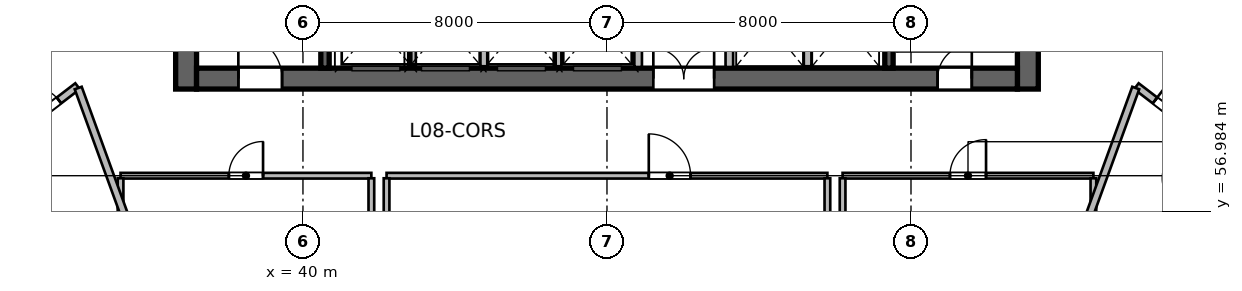
"""IFC4 building model, lengths in metres.
Left out: names, types, materials, properties, quantities, classifications, styles, units other than length and angle.
Written with IfcOpenShell. Run it as: python <this file> out.ifc"""

import sys

from ifc_helpers import new_model, si_unit, direction, frame, frame_2d, origin, place, context, subcontext, project, spatial, rectangle, extrude, source, transform, mapped, element, fill, save


model = new_model("IFC4")
c1 = context("Model", 3, precision=1e-05, world=origin(), true_north=direction((0.0, 1.0)))
c2 = subcontext(c1, "Body", "Model", "MODEL_VIEW")
j1 = project(units=[si_unit("LENGTHUNIT", "METRE"), si_unit("PLANEANGLEUNIT", "RADIAN")], contexts=[c1])
p1 = place(None, origin())
s1 = spatial("IfcSite", under=j1, at=p1, CompositionType="ELEMENT")
p2 = place(p1, origin())
s2 = spatial("IfcBuilding", under=s1, at=p2, CompositionType="ELEMENT")
p3 = place(p2, frame((0.0, 0.0, 42.6)))
s3 = spatial("IfcBuildingStorey", under=s2, at=p3, CompositionType="ELEMENT", Elevation=42.6)
m1 = source(origin(), c2, "Body", "SweptSolid", [
    extrude(rectangle(XDim=12.0, YDim=0.55, at=frame_2d((6.0, 0.0))), origin(), (0.0, 0.0, 1.0), 3.6),
])
for number, where, z_axis, x_axis in (
    (1, (36.925, 60.2, 0.0), (0.0, 0.0, 1.0), (0.0, 1.0, 0.0)),
    (2, (59.075, 60.2, 0.0), (0.0, 0.0, 1.0), (0.0, 1.0, 0.0)),
):
    element("IfcWall", number, at=place(p3, frame(where, z_axis=z_axis, x_axis=x_axis)), inside=s3, PredefinedType="SHEAR", context=c2, shape_type="MappedRepresentation", body=[
        mapped(m1, transform((0.0, 0.0, 0.0), scale=1.0)),
    ])
m2 = source(origin(), c2, "Body", "SweptSolid", [
    extrude(rectangle(XDim=21.6, YDim=0.55, at=frame_2d((10.8, 0.0))), origin(), (0.0, 0.0, 1.0), 3.6),
])
p4 = place(p3, frame((37.2, 60.475, 0.0), z_axis=(0.0, 0.0, 1.0), x_axis=(1.0, 0.0, 0.0)))
e3 = element("IfcWall", 3, at=p4, inside=s3, PredefinedType="SHEAR", context=c2, shape_type="MappedRepresentation", body=[
    mapped(m2, transform((0.0, 0.0, 0.0), scale=1.0)),
])
p5 = place(p4, frame((1.1, 0.0, 0.0)))
e4 = element("IfcOpeningElement", 4, at=p5, cuts=e3, PredefinedType="OPENING", context=c2, shape_type="SweptSolid", body=[
    extrude(rectangle(XDim=1.15, YDim=2.15, at=frame_2d((0.575, 1.075))), frame((0.0, 0.285, 0.0), z_axis=(0.0, -1.0, 0.0), x_axis=(1.0, 0.0, 0.0)), (0.0, 0.0, 1.0), 0.57),
])
p6 = place(p4, frame((19.5, 0.0, 0.0)))
e5 = element("IfcOpeningElement", 5, at=p6, cuts=e3, PredefinedType="OPENING", context=c2, shape_type="SweptSolid", body=[
    extrude(rectangle(XDim=0.9, YDim=2.1, at=frame_2d((0.45, 1.05))), frame((0.0, 0.285, 0.0), z_axis=(0.0, -1.0, 0.0), x_axis=(1.0, 0.0, 0.0)), (0.0, 0.0, 1.0), 0.57),
])
p7 = place(p4, frame((12.02, 0.0, 0.0)))
e6 = element("IfcOpeningElement", 6, at=p7, cuts=e3, PredefinedType="OPENING", context=c2, shape_type="SweptSolid", body=[
    extrude(rectangle(XDim=1.6, YDim=2.15, at=frame_2d((0.8, 1.075))), frame((0.0, 0.285, 0.0), z_axis=(0.0, -1.0, 0.0), x_axis=(1.0, 0.0, 0.0)), (0.0, 0.0, 1.0), 0.57),
])
m3 = source(origin(), c2, "Body", "SweptSolid", [
    extrude(rectangle(XDim=10.9, YDim=0.22, at=frame_2d((5.45, 0.0))), origin(), (0.0, 0.0, 1.0), 3.6),
])
p8 = place(p3, frame((40.58, 60.75, 0.0), z_axis=(0.0, 0.0, 1.0), x_axis=(0.0, 1.0, 0.0)))
e7 = element("IfcWall", 7, at=p8, inside=s3, PredefinedType="SHEAR", context=c2, shape_type="MappedRepresentation", body=[
    mapped(m3, transform((0.0, 0.0, 0.0), scale=1.0)),
])
p9 = place(p3, frame((55.42, 60.75, 0.0), z_axis=(0.0, 0.0, 1.0), x_axis=(0.0, 1.0, 0.0)))
e8 = element("IfcWall", 8, at=p9, inside=s3, PredefinedType="SHEAR", context=c2, shape_type="MappedRepresentation", body=[
    mapped(m3, transform((0.0, 0.0, 0.0), scale=1.0)),
])
p10 = place(p9, frame((9.495, 0.0, 0.0)))
e9 = element("IfcOpeningElement", 9, at=p10, cuts=e8, PredefinedType="OPENING", context=c2, shape_type="SweptSolid", body=[
    extrude(rectangle(XDim=1.15, YDim=2.15, at=frame_2d((0.575, 1.075))), frame((0.0, 0.12, 0.0), z_axis=(0.0, -1.0, 0.0), x_axis=(1.0, 0.0, 0.0)), (0.0, 0.0, 1.0), 0.24),
])
m4 = source(origin(), c2, "Body", "SweptSolid", [
    extrude(rectangle(XDim=2.24, YDim=0.2, at=frame_2d((1.12, 0.0))), origin(), (0.0, 0.0, 1.0), 3.36),
])
for number, where, z_axis, x_axis in (
    (10, (48.82, 60.78, 0.0), (0.0, 0.0, 1.0), (0.0, 1.0, 0.0)),
    (11, (51.22, 60.78, 0.0), (0.0, 0.0, 1.0), (0.0, 1.0, 0.0)),
):
    element("IfcWall", number, at=place(p3, frame(where, z_axis=z_axis, x_axis=x_axis)), inside=s3, PredefinedType="SOLIDWALL", context=c2, shape_type="MappedRepresentation", body=[
        mapped(m4, transform((0.0, 0.0, 0.0), scale=1.0)),
    ])
m5 = source(origin(), c2, "Body", "SweptSolid", [
    extrude(rectangle(XDim=2.2, YDim=0.2, at=frame_2d((1.1, 0.0))), origin(), (0.0, 0.0, 1.0), 3.36),
])
for number, where, z_axis, x_axis in (
    (12, (42.87, 60.8, 0.0), (0.0, 0.0, 1.0), (0.0, 1.0, 0.0)),
    (13, (44.77, 60.8, 0.0), (0.0, 0.0, 1.0), (0.0, 1.0, 0.0)),
    (14, (46.7, 60.8, 0.0), (0.0, 0.0, 1.0), (0.0, 1.0, 0.0)),
    (15, (53.28, 60.8, 0.0), (0.0, 0.0, 1.0), (0.0, 1.0, 0.0)),
):
    element("IfcWall", number, at=place(p3, frame(where, z_axis=z_axis, x_axis=x_axis)), inside=s3, PredefinedType="SOLIDWALL", context=c2, shape_type="MappedRepresentation", body=[
        mapped(m5, transform((0.0, 0.0, 0.0), scale=1.0)),
    ])
m6 = source(origin(), c2, "Body", "SweptSolid", [
    extrude(rectangle(XDim=6.6, YDim=0.15, at=frame_2d((3.3, 0.0))), origin(), (0.0, 0.0, 1.0), 3.36),
])
p11 = place(p3, frame((35.2, 57.92, 0.0), z_axis=(0.0, 0.0, 1.0), x_axis=(1.0, 0.0, 0.0)))
e16 = element("IfcWall", 16, at=p11, inside=s3, PredefinedType="PARTITIONING", context=c2, shape_type="MappedRepresentation", body=[
    mapped(m6, transform((0.0, 0.0, 0.0), scale=1.0)),
])
p12 = place(p11, frame((2.85, 0.0, 0.0)))
e17 = element("IfcOpeningElement", 17, at=p12, cuts=e16, PredefinedType="OPENING", context=c2, shape_type="SweptSolid", body=[
    extrude(rectangle(XDim=0.9, YDim=2.1, at=frame_2d((0.45, 1.05))), frame((0.0, 0.085, 0.0), z_axis=(0.0, -1.0, 0.0), x_axis=(1.0, 0.0, 0.0)), (0.0, 0.0, 1.0), 0.17),
])
m7 = source(origin(), c2, "Body", "SweptSolid", [
    extrude(rectangle(XDim=3.785, YDim=0.15, at=frame_2d((1.893, 0.0))), origin(), (0.0, 0.0, 1.0), 3.36),
])
for number, where, z_axis, x_axis in (
    (18, (35.2, 54.067, 0.0), (0.0, 0.0, 1.0), (0.0, 1.0, 0.0)),
    (19, (41.8, 54.067, 0.0), (0.0, 0.0, 1.0), (0.0, 1.0, 0.0)),
):
    element("IfcWall", number, at=place(p3, frame(where, z_axis=z_axis, x_axis=x_axis)), inside=s3, PredefinedType="PARTITIONING", context=c2, shape_type="MappedRepresentation", body=[
        mapped(m7, transform((0.0, 0.0, 0.0), scale=1.0)),
    ])
m8 = source(origin(), c2, "Body", "SweptSolid", [
    extrude(rectangle(XDim=11.6, YDim=0.15, at=frame_2d((5.8, 0.0))), origin(), (0.0, 0.0, 1.0), 3.36),
])
p13 = place(p3, frame((42.2, 57.92, 0.0), z_axis=(0.0, 0.0, 1.0), x_axis=(1.0, 0.0, 0.0)))
e20 = element("IfcWall", 20, at=p13, inside=s3, PredefinedType="PARTITIONING", context=c2, shape_type="MappedRepresentation", body=[
    mapped(m8, transform((0.0, 0.0, 0.0), scale=1.0)),
])
p14 = place(p13, frame((6.9, 0.0, 0.0)))
e21 = element("IfcOpeningElement", 21, at=p14, cuts=e20, PredefinedType="OPENING", context=c2, shape_type="SweptSolid", body=[
    extrude(rectangle(XDim=1.1, YDim=2.15, at=frame_2d((0.55, 1.075))), frame((0.0, 0.085, 0.0), z_axis=(0.0, -1.0, 0.0), x_axis=(1.0, 0.0, 0.0)), (0.0, 0.0, 1.0), 0.17),
])
for number, where, z_axis, x_axis in (
    (22, (42.2, 54.067, 0.0), (0.0, 0.0, 1.0), (0.0, 1.0, 0.0)),
    (23, (53.8, 54.067, 0.0), (0.0, 0.0, 1.0), (0.0, 1.0, 0.0)),
):
    element("IfcWall", number, at=place(p3, frame(where, z_axis=z_axis, x_axis=x_axis)), inside=s3, PredefinedType="PARTITIONING", context=c2, shape_type="MappedRepresentation", body=[
        mapped(m7, transform((0.0, 0.0, 0.0), scale=1.0)),
    ])
p15 = place(p3, frame((54.2, 57.92, 0.0), z_axis=(0.0, 0.0, 1.0), x_axis=(1.0, 0.0, 0.0)))
e24 = element("IfcWall", 24, at=p15, inside=s3, PredefinedType="PARTITIONING", context=c2, shape_type="MappedRepresentation", body=[
    mapped(m6, transform((0.0, 0.0, 0.0), scale=1.0)),
])
p16 = place(p15, frame((2.825, 0.0, 0.0)))
e25 = element("IfcOpeningElement", 25, at=p16, cuts=e24, PredefinedType="OPENING", context=c2, shape_type="SweptSolid", body=[
    extrude(rectangle(XDim=0.95, YDim=2.1, at=frame_2d((0.475, 1.05))), frame((0.0, 0.085, 0.0), z_axis=(0.0, -1.0, 0.0), x_axis=(1.0, 0.0, 0.0)), (0.0, 0.0, 1.0), 0.17),
])
for number, where, z_axis, x_axis in (
    (26, (54.2, 54.067, 0.0), (0.0, 0.0, 1.0), (0.0, 1.0, 0.0)),
    (27, (60.8, 54.067, 0.0), (0.0, 0.0, 1.0), (0.0, 1.0, 0.0)),
):
    element("IfcWall", number, at=place(p3, frame(where, z_axis=z_axis, x_axis=x_axis)), inside=s3, PredefinedType="PARTITIONING", context=c2, shape_type="MappedRepresentation", body=[
        mapped(m7, transform((0.0, 0.0, 0.0), scale=1.0)),
    ])
m9 = source(origin(), c2, "Body", "SweptSolid", [
    extrude(rectangle(XDim=11.844, YDim=0.195, at=frame_2d((5.922, 0.0))), origin(), (0.0, 0.0, 1.0), 2.644),
])
p17 = place(p3, frame((35.727, 46.848, 0.0), z_axis=(0.0, 0.0, 1.0), x_axis=(-0.442871152218, 0.896585267854, 0.0)))
e28 = element("IfcWall", 28, at=p17, inside=s3, PredefinedType="PARTITIONING", context=c2, shape_type="MappedRepresentation", body=[
    mapped(m9, transform((0.0, 0.0, 0.0), scale=1.0)),
])
m10 = source(origin(), c2, "Body", "SweptSolid", [
    extrude(rectangle(XDim=4.546, YDim=0.195, at=frame_2d((2.273, 0.0))), origin(), (0.0, 0.0, 1.0), 3.36),
])
p18 = place(p3, frame((30.459, 57.511, 0.0), z_axis=(0.0, 0.0, 1.0), x_axis=(0.793907931297, 0.608037989457, 0.0)))
e29 = element("IfcWall", 29, at=p18, inside=s3, PredefinedType="PARTITIONING", context=c2, shape_type="MappedRepresentation", body=[
    mapped(m10, transform((0.0, 0.0, 0.0), scale=1.0)),
])
p19 = place(p18, frame((2.98, 0.0, 0.0)))
e30 = element("IfcOpeningElement", 30, at=p19, cuts=e29, PredefinedType="OPENING", context=c2, shape_type="SweptSolid", body=[
    extrude(rectangle(XDim=0.95, YDim=2.15, at=frame_2d((0.475, 1.075))), frame((0.0, 0.107, 0.0), z_axis=(0.0, -1.0, 0.0), x_axis=(1.0, 0.0, 0.0)), (0.0, 0.0, 1.0), 0.215),
])
m11 = source(origin(), c2, "Body", "SweptSolid", [
    extrude(rectangle(XDim=12.196, YDim=0.195, at=frame_2d((6.098, 0.0))), origin(), (0.0, 0.0, 1.0), 3.36),
])
p20 = place(p3, frame((38.258, 48.766, 0.0), z_axis=(0.0, 0.0, 1.0), x_axis=(-0.342022711534, 0.939691686031, 0.0)))
e31 = element("IfcWall", 31, at=p20, inside=s3, PredefinedType="PARTITIONING", context=c2, shape_type="MappedRepresentation", body=[
    mapped(m11, transform((0.0, 0.0, 0.0), scale=1.0)),
])
p21 = place(p3, frame((61.931, 60.275, 0.0), z_axis=(0.0, 0.0, 1.0), x_axis=(0.793907931297, -0.608037989457, 0.0)))
e32 = element("IfcWall", 32, at=p21, inside=s3, PredefinedType="PARTITIONING", context=c2, shape_type="MappedRepresentation", body=[
    mapped(m10, transform((0.0, 0.0, 0.0), scale=1.0)),
])
p22 = place(p21, frame((0.616, 0.0, 0.0)))
e33 = element("IfcOpeningElement", 33, at=p22, cuts=e32, PredefinedType="OPENING", context=c2, shape_type="SweptSolid", body=[
    extrude(rectangle(XDim=0.95, YDim=2.15, at=frame_2d((0.475, 1.075))), frame((0.0, 0.107, 0.0), z_axis=(0.0, -1.0, 0.0), x_axis=(1.0, 0.0, 0.0)), (0.0, 0.0, 1.0), 0.215),
])
p23 = place(p3, frame((57.742, 48.766, 0.0), z_axis=(0.0, 0.0, 1.0), x_axis=(0.342022711534, 0.939691686031, 0.0)))
e34 = element("IfcWall", 34, at=p23, inside=s3, PredefinedType="PARTITIONING", context=c2, shape_type="MappedRepresentation", body=[
    mapped(m11, transform((0.0, 0.0, 0.0), scale=1.0)),
])
m12 = source(origin(), c2, "Body", "SweptSolid", [
    extrude(rectangle(XDim=11.844, YDim=0.195, at=frame_2d((5.922, 0.0))), origin(), (0.0, 0.0, 1.0), 3.36),
])
p24 = place(p3, frame((60.273, 46.848, 0.0), z_axis=(0.0, 0.0, 1.0), x_axis=(0.442871152218, 0.896585267854, 0.0)))
e35 = element("IfcWall", 35, at=p24, inside=s3, PredefinedType="PARTITIONING", context=c2, shape_type="MappedRepresentation", body=[
    mapped(m12, transform((0.0, 0.0, 0.0), scale=1.0)),
])
m13 = source(origin(), c2, "Body", "SweptSolid", [
    extrude(rectangle(XDim=1.15, YDim=2.15, at=frame_2d((0.575, 1.075))), frame((0.0, 0.025, 0.0), z_axis=(0.0, -1.0, 0.0), x_axis=(1.0, 0.0, 0.0)), (0.0, 0.0, 1.0), 0.05),
])
p25 = place(p5, origin())
e36 = element("IfcDoor", 36, at=p25, inside=s3, OperationType="SINGLE_SWING_LEFT", PredefinedType="DOOR", context=c2, shape_type="MappedRepresentation", body=[
    mapped(m13, transform((0.0, 0.0, 0.0), scale=1.0)),
])
fill(e4, e36)
m14 = source(origin(), c2, "Body", "SweptSolid", [
    extrude(rectangle(XDim=0.9, YDim=2.1, at=frame_2d((0.45, 1.05))), frame((0.0, 0.025, 0.0), z_axis=(0.0, -1.0, 0.0), x_axis=(1.0, 0.0, 0.0)), (0.0, 0.0, 1.0), 0.05),
])
p26 = place(p6, origin())
e37 = element("IfcDoor", 37, at=p26, inside=s3, OperationType="SINGLE_SWING_RIGHT", PredefinedType="DOOR", context=c2, shape_type="MappedRepresentation", body=[
    mapped(m14, transform((0.0, 0.0, 0.0), scale=1.0)),
])
fill(e5, e37)
m15 = source(origin(), c2, "Body", "SweptSolid", [
    extrude(rectangle(XDim=1.6, YDim=2.15, at=frame_2d((0.8, 1.075))), frame((0.0, 0.025, 0.0), z_axis=(0.0, -1.0, 0.0), x_axis=(1.0, 0.0, 0.0)), (0.0, 0.0, 1.0), 0.05),
])
p27 = place(p7, origin())
e38 = element("IfcDoor", 38, at=p27, inside=s3, OperationType="DOUBLE_DOOR_SINGLE_SWING", PredefinedType="DOOR", context=c2, shape_type="MappedRepresentation", body=[
    mapped(m15, transform((0.0, 0.0, 0.0), scale=1.0)),
])
fill(e6, e38)
p28 = place(p12, origin())
e39 = element("IfcDoor", 39, at=p28, inside=s3, OperationType="SINGLE_SWING_RIGHT", PredefinedType="DOOR", context=c2, shape_type="MappedRepresentation", body=[
    mapped(m14, transform((0.0, 0.0, 0.0), scale=1.0)),
])
fill(e17, e39)
m16 = source(origin(), c2, "Body", "SweptSolid", [
    extrude(rectangle(XDim=1.1, YDim=2.15, at=frame_2d((0.55, 1.075))), frame((0.0, 0.025, 0.0), z_axis=(0.0, -1.0, 0.0), x_axis=(1.0, 0.0, 0.0)), (0.0, 0.0, 1.0), 0.05),
])
p29 = place(p14, origin())
e40 = element("IfcDoor", 40, at=p29, inside=s3, OperationType="SINGLE_SWING_LEFT", PredefinedType="DOOR", context=c2, shape_type="MappedRepresentation", body=[
    mapped(m16, transform((0.0, 0.0, 0.0), scale=1.0)),
])
fill(e21, e40)
m17 = source(origin(), c2, "Body", "SweptSolid", [
    extrude(rectangle(XDim=0.95, YDim=2.1, at=frame_2d((0.475, 1.05))), frame((0.0, 0.025, 0.0), z_axis=(0.0, -1.0, 0.0), x_axis=(1.0, 0.0, 0.0)), (0.0, 0.0, 1.0), 0.05),
])
p30 = place(p16, origin())
e41 = element("IfcDoor", 41, at=p30, inside=s3, OperationType="SINGLE_SWING_RIGHT", PredefinedType="DOOR", context=c2, shape_type="MappedRepresentation", body=[
    mapped(m17, transform((0.0, 0.0, 0.0), scale=1.0)),
])
fill(e25, e41)
m18 = source(origin(), c2, "Body", "SweptSolid", [
    extrude(rectangle(XDim=0.95, YDim=2.15, at=frame_2d((0.475, 1.075))), frame((0.0, 0.025, 0.0), z_axis=(0.0, -1.0, 0.0), x_axis=(1.0, 0.0, 0.0)), (0.0, 0.0, 1.0), 0.05),
])
p31 = place(p19, origin())
e42 = element("IfcDoor", 42, at=p31, inside=s3, OperationType="SINGLE_SWING_LEFT", PredefinedType="DOOR", context=c2, shape_type="MappedRepresentation", body=[
    mapped(m18, transform((0.0, 0.0, 0.0), scale=1.0)),
])
fill(e30, e42)
p32 = place(p22, origin())
e43 = element("IfcDoor", 43, at=p32, inside=s3, OperationType="SINGLE_SWING_LEFT", PredefinedType="DOOR", context=c2, shape_type="MappedRepresentation", body=[
    mapped(m18, transform((0.0, 0.0, 0.0), scale=1.0)),
])
fill(e33, e43)
save(model, sys.argv[1])
